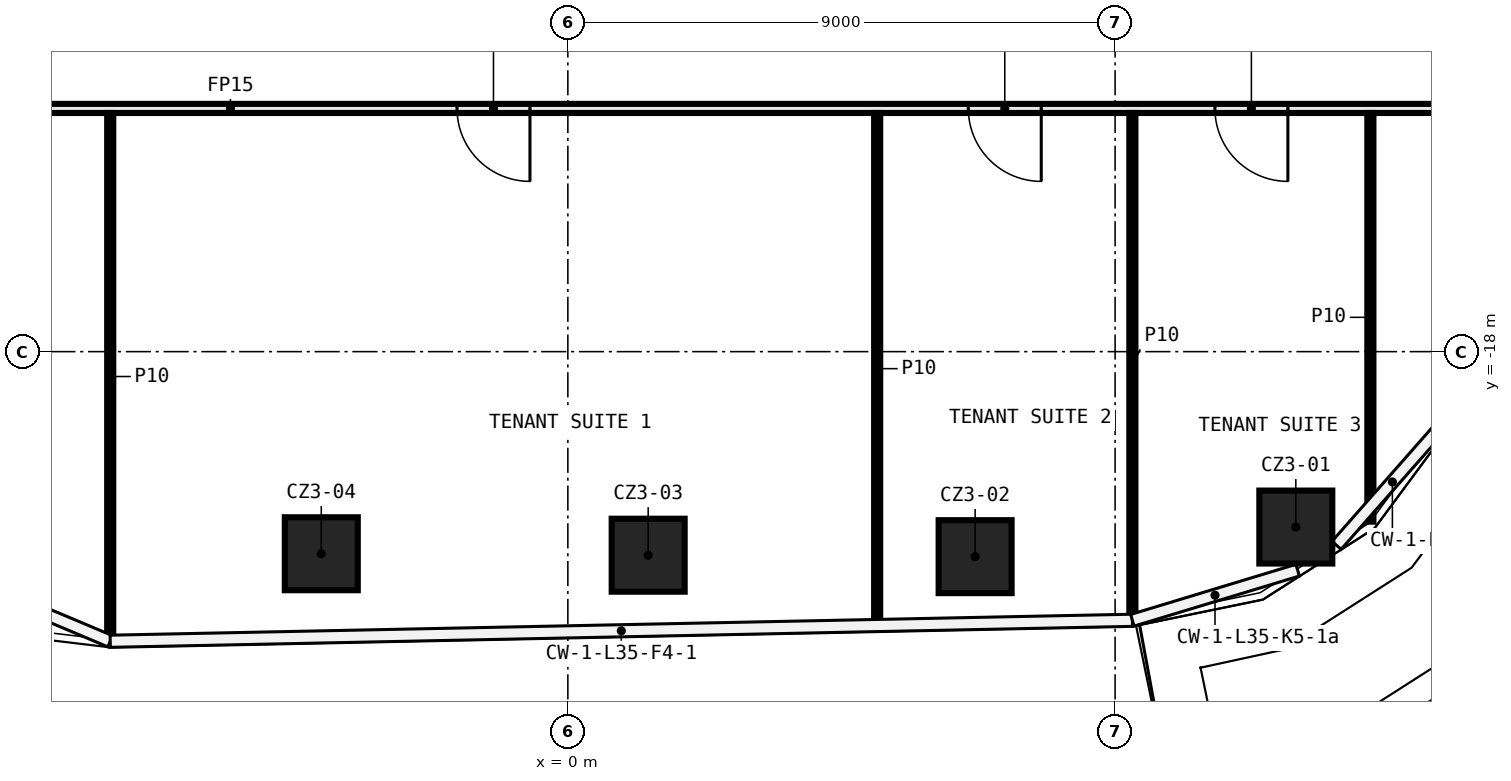
"""IFC4 building model, lengths in metres.
Left out: names, types, materials, properties, quantities, classifications, styles, units other than length and angle.
Written with IfcOpenShell. Run it as: python <this file> out.ifc"""

import sys

from ifc_helpers import new_model, si_unit, direction, frame, frame_2d, origin, origin_2d, place, context, subcontext, project, spatial, rectangle, extrude, element, fill, save


model = new_model("IFC4")
c1 = context("Model", 3, precision=1e-05, world=origin(), true_north=direction((0.0, 1.0)))
c2 = subcontext(c1, "Body", "Model", "MODEL_VIEW")
j1 = project(units=[si_unit("LENGTHUNIT", "METRE"), si_unit("PLANEANGLEUNIT", "RADIAN")], contexts=[c1])
p1 = place(None, origin())
s1 = spatial("IfcSite", under=j1, at=p1, CompositionType="ELEMENT")
p2 = place(p1, origin())
s2 = spatial("IfcBuilding", under=s1, at=p2, CompositionType="ELEMENT")
p3 = place(p2, frame((0.0, 0.0, 162.8)))
s3 = spatial("IfcBuildingStorey", under=s2, at=p3, CompositionType="ELEMENT", Elevation=162.8)
for number, where, z_axis, x_axis in (
    (1, (11.972, -20.885, 0.0), (0.0, 0.0, 1.0), (1.0, 0.0, 0.0)),
    (2, (6.698, -21.372, 0.0), (0.0, 0.0, 1.0), (1.0, 0.0, 0.0)),
    (3, (1.321, -21.348, 0.0), (0.0, 0.0, 1.0), (1.0, 0.0, 0.0)),
    (4, (-4.055, -21.324, 0.0), (0.0, 0.0, 1.0), (1.0, 0.0, 0.0)),
):
    element("IfcColumn", number, at=place(p3, frame(where, z_axis=z_axis, x_axis=x_axis)), inside=s3, PredefinedType="COLUMN", context=c2, shape_type="SweptSolid", body=[
        extrude(rectangle(XDim=1.2, YDim=1.2, at=origin_2d()), origin(), (0.0, 0.0, 1.0), 3.82),
    ])
p4 = place(p3, frame((15.165, -14.0, 0.0), z_axis=(0.0, 0.0, 1.0), x_axis=(-1.0, 0.0, 0.0)))
e5 = element("IfcWall", 5, at=p4, inside=s3, PredefinedType="PARTITIONING", context=c2, shape_type="SweptSolid", body=[
    extrude(rectangle(XDim=24.24, YDim=0.15, at=frame_2d((12.12, 0.0))), origin(), (0.0, 0.0, 1.0), 3.82),
])
p5 = place(p4, frame((15.788, 0.0, 0.0)))
e6 = element("IfcOpeningElement", 6, at=p5, cuts=e5, PredefinedType="OPENING", context=c2, shape_type="SweptSolid", body=[
    extrude(rectangle(XDim=1.2, YDim=2.1, at=frame_2d((0.6, 1.05))), frame((0.0, 0.085, 0.0), z_axis=(0.0, -1.0, 0.0), x_axis=(1.0, 0.0, 0.0)), (0.0, 0.0, 1.0), 0.17),
])
p6 = place(p4, frame((7.379, 0.0, 0.0)))
e7 = element("IfcOpeningElement", 7, at=p6, cuts=e5, PredefinedType="OPENING", context=c2, shape_type="SweptSolid", body=[
    extrude(rectangle(XDim=1.2, YDim=2.1, at=frame_2d((0.6, 1.05))), frame((0.0, 0.085, 0.0), z_axis=(0.0, -1.0, 0.0), x_axis=(1.0, 0.0, 0.0)), (0.0, 0.0, 1.0), 0.17),
])
p7 = place(p4, frame((3.323, 0.0, 0.0)))
e8 = element("IfcOpeningElement", 8, at=p7, cuts=e5, PredefinedType="OPENING", context=c2, shape_type="SweptSolid", body=[
    extrude(rectangle(XDim=1.2, YDim=2.1, at=frame_2d((0.6, 1.05))), frame((0.0, 0.085, 0.0), z_axis=(0.0, -1.0, 0.0), x_axis=(1.0, 0.0, 0.0)), (0.0, 0.0, 1.0), 0.17),
])
p8 = place(p3, frame((13.198, -20.796, 0.0), z_axis=(0.0, 0.0, 1.0), x_axis=(0.0, 1.0, 0.0)))
e9 = element("IfcWall", 9, at=p8, inside=s3, PredefinedType="PARTITIONING", context=c2, shape_type="SweptSolid", body=[
    extrude(rectangle(XDim=6.721, YDim=0.1, at=frame_2d((3.361, 0.0))), origin(), (0.0, 0.0, 1.0), 3.82),
])
p9 = place(p3, frame((9.284, -22.398, 0.0), z_axis=(0.0, 0.0, 1.0), x_axis=(0.0, 1.0, 0.0)))
e10 = element("IfcWall", 10, at=p9, inside=s3, PredefinedType="PARTITIONING", context=c2, shape_type="SweptSolid", body=[
    extrude(rectangle(XDim=8.323, YDim=0.1, at=frame_2d((4.162, 0.0))), origin(), (0.0, 0.0, 1.0), 3.82),
])
p10 = place(p3, frame((5.087, -22.485, 0.0), z_axis=(0.0, 0.0, 1.0), x_axis=(0.0, 1.0, 0.0)))
e11 = element("IfcWall", 11, at=p10, inside=s3, PredefinedType="PARTITIONING", context=c2, shape_type="SweptSolid", body=[
    extrude(rectangle(XDim=8.41, YDim=0.1, at=frame_2d((4.205, 0.0))), origin(), (0.0, 0.0, 1.0), 3.82),
])
p11 = place(p3, frame((-7.526, -22.743, 0.0), z_axis=(0.0, 0.0, 1.0), x_axis=(0.0, 1.0, 0.0)))
e12 = element("IfcWall", 12, at=p11, inside=s3, PredefinedType="PARTITIONING", context=c2, shape_type="SweptSolid", body=[
    extrude(rectangle(XDim=8.668, YDim=0.1, at=frame_2d((4.334, 0.0))), origin(), (0.0, 0.0, 1.0), 3.82),
])
p12 = place(p5, origin())
e13 = element("IfcDoor", 13, at=p12, inside=s3, OperationType="SINGLE_SWING_RIGHT", PredefinedType="DOOR", context=c2, shape_type="SweptSolid", body=[
    extrude(rectangle(XDim=1.2, YDim=2.1, at=frame_2d((0.6, 1.05))), frame((0.0, 0.025, 0.0), z_axis=(0.0, -1.0, 0.0), x_axis=(1.0, 0.0, 0.0)), (0.0, 0.0, 1.0), 0.05),
])
fill(e6, e13)
p13 = place(p6, origin())
e14 = element("IfcDoor", 14, at=p13, inside=s3, OperationType="SINGLE_SWING_LEFT", PredefinedType="DOOR", context=c2, shape_type="SweptSolid", body=[
    extrude(rectangle(XDim=1.2, YDim=2.1, at=frame_2d((0.6, 1.05))), frame((0.0, 0.025, 0.0), z_axis=(0.0, -1.0, 0.0), x_axis=(1.0, 0.0, 0.0)), (0.0, 0.0, 1.0), 0.05),
])
fill(e7, e14)
p14 = place(p7, origin())
e15 = element("IfcDoor", 15, at=p14, inside=s3, OperationType="SINGLE_SWING_RIGHT", PredefinedType="DOOR", context=c2, shape_type="SweptSolid", body=[
    extrude(rectangle(XDim=1.2, YDim=2.1, at=frame_2d((0.6, 1.05))), frame((0.0, 0.025, 0.0), z_axis=(0.0, -1.0, 0.0), x_axis=(1.0, 0.0, 0.0)), (0.0, 0.0, 1.0), 0.05),
])
fill(e8, e15)
save(model, sys.argv[1])
